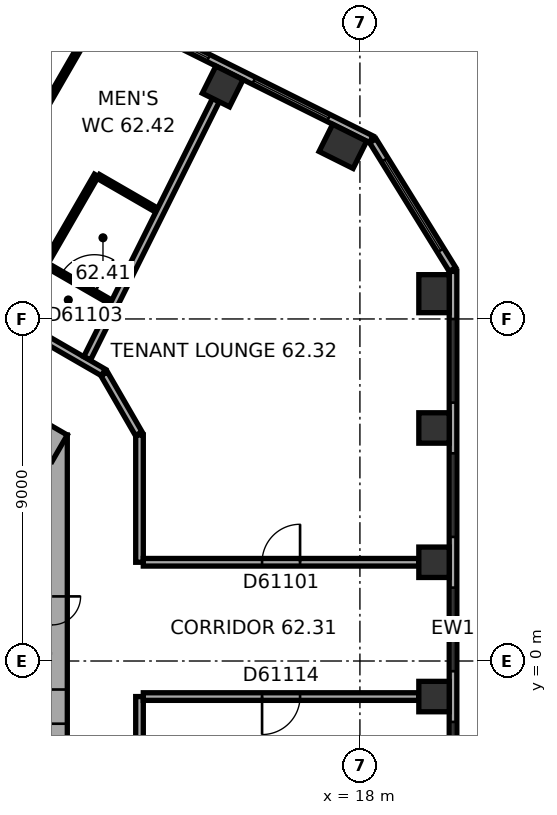
"""IFC4 building model, lengths in metres.
Left out: names, types, materials, properties, quantities, classifications, styles, units other than length and angle.
Written with IfcOpenShell. Run it as: python <this file> out.ifc"""

import sys

from ifc_helpers import new_model, si_unit, direction, frame, frame_2d, origin, origin_2d, place, context, subcontext, project, spatial, rectangle, extrude, element, fill, save


model = new_model("IFC4")
c1 = context("Model", 3, precision=1e-05, world=origin(), true_north=direction((0.0, 1.0)))
c2 = subcontext(c1, "Body", "Model", "MODEL_VIEW")
j1 = project(units=[si_unit("LENGTHUNIT", "METRE"), si_unit("PLANEANGLEUNIT", "RADIAN")], contexts=[c1])
p1 = place(None, origin())
s1 = spatial("IfcSite", under=j1, at=p1, CompositionType="ELEMENT")
p2 = place(p1, origin())
s2 = spatial("IfcBuilding", under=s1, at=p2, CompositionType="ELEMENT")
p3 = place(p2, frame((0.0, 0.0, 251.3)))
s3 = spatial("IfcBuildingStorey", under=s2, at=p3, CompositionType="ELEMENT", Elevation=251.3)
for number, where, z_axis, x_axis in (
    (1, (19.95, -0.936, 0.0), (0.0, 0.0, 1.0), (0.0, 1.0, 0.0)),
    (2, (19.95, 2.598, 0.0), (0.0, 0.0, 1.0), (0.0, 1.0, 0.0)),
    (3, (19.95, 6.132, 0.0), (0.0, 0.0, 1.0), (0.0, 1.0, 0.0)),
):
    element("IfcColumn", number, at=place(p3, frame(where, z_axis=z_axis, x_axis=x_axis)), inside=s3, PredefinedType="COLUMN", context=c2, shape_type="SweptSolid", body=[
        extrude(rectangle(XDim=0.8, YDim=0.8, at=origin_2d()), origin(), (0.0, 0.0, 1.0), 3.7),
    ])
for number, where, z_axis, x_axis in (
    (4, (19.95, 9.665, 0.0), (0.0, 0.0, 1.0), (0.0, 1.0, 0.0)),
    (5, (17.552, 13.541, 0.0), (0.0, 0.0, 1.0), (-0.895, 0.446, 0.0)),
):
    element("IfcColumn", number, at=place(p3, frame(where, z_axis=z_axis, x_axis=x_axis)), inside=s3, PredefinedType="COLUMN", context=c2, shape_type="SweptSolid", body=[
        extrude(rectangle(XDim=1.0, YDim=0.8, at=origin_2d()), origin(), (0.0, 0.0, 1.0), 3.7),
    ])
p4 = place(p3, frame((14.389, 15.118, 0.0), z_axis=(0.0, 0.0, 1.0), x_axis=(-0.894934361602, 0.44619781311, 0.0)))
e6 = element("IfcColumn", 6, at=p4, inside=s3, PredefinedType="COLUMN", context=c2, shape_type="SweptSolid", body=[
    extrude(rectangle(XDim=0.8, YDim=0.8, at=origin_2d()), origin(), (0.0, 0.0, 1.0), 3.7),
])
p5 = place(p3, frame((9.9, -5.947, 0.0), z_axis=(0.0, 0.0, 1.0), x_axis=(0.0, 1.0, 0.0)))
e7 = element("IfcWall", 7, at=p5, inside=s3, PredefinedType="SHEAR", context=c2, shape_type="SweptSolid", body=[
    extrude(rectangle(XDim=11.894, YDim=0.8, at=frame_2d((5.947, 0.0))), origin(), (0.0, 0.0, 1.0), 3.7),
])
p6 = place(p5, frame((6.147, 0.0, 0.0)))
e8 = element("IfcOpeningElement", 8, at=p6, cuts=e7, PredefinedType="OPENING", context=c2, shape_type="SweptSolid", body=[
    extrude(rectangle(XDim=1.5, YDim=2.1, at=frame_2d((0.75, 1.05))), frame((0.0, 0.41, 0.0), z_axis=(0.0, -1.0, 0.0), x_axis=(1.0, 0.0, 0.0)), (0.0, 0.0, 1.0), 0.82),
])
p7 = place(p5, frame((1.697, 0.0, 0.0)))
e9 = element("IfcOpeningElement", 9, at=p7, cuts=e7, PredefinedType="OPENING", context=c2, shape_type="SweptSolid", body=[
    extrude(rectangle(XDim=0.9, YDim=2.1, at=frame_2d((0.45, 1.05))), frame((0.0, 0.41, 0.0), z_axis=(0.0, -1.0, 0.0), x_axis=(1.0, 0.0, 0.0)), (0.0, 0.0, 1.0), 0.82),
])
p8 = place(p5, frame((4.297, 0.0, 0.0)))
e10 = element("IfcOpeningElement", 10, at=p8, cuts=e7, PredefinedType="OPENING", context=c2, shape_type="SweptSolid", body=[
    extrude(rectangle(XDim=0.9, YDim=2.1, at=frame_2d((0.45, 1.05))), frame((0.0, 0.41, 0.0), z_axis=(0.0, -1.0, 0.0), x_axis=(1.0, 0.0, 0.0)), (0.0, 0.0, 1.0), 0.82),
])
p9 = place(p3, frame((10.1, 5.6, 0.0), z_axis=(0.0, 0.0, 1.0), x_axis=(-0.866023897231, 0.500002609418, 0.0)))
e11 = element("IfcWall", 11, at=p9, inside=s3, PredefinedType="SHEAR", context=c2, shape_type="SweptSolid", body=[
    extrude(rectangle(XDim=11.894, YDim=0.8, at=frame_2d((5.947, 0.0))), origin(), (0.0, 0.0, 1.0), 3.7),
])
p10 = place(p9, frame((3.897, 0.0, 0.0)))
e12 = element("IfcOpeningElement", 12, at=p10, cuts=e11, PredefinedType="OPENING", context=c2, shape_type="SweptSolid", body=[
    extrude(rectangle(XDim=0.9, YDim=2.1, at=frame_2d((0.45, 1.05))), frame((0.0, 0.41, 0.0), z_axis=(0.0, -1.0, 0.0), x_axis=(1.0, 0.0, 0.0)), (0.0, 0.0, 1.0), 0.82),
])
p11 = place(p9, frame((7.797, 0.0, 0.0)))
e13 = element("IfcOpeningElement", 13, at=p11, cuts=e11, PredefinedType="OPENING", context=c2, shape_type="SweptSolid", body=[
    extrude(rectangle(XDim=0.9, YDim=2.1, at=frame_2d((0.45, 1.05))), frame((0.0, 0.41, 0.0), z_axis=(0.0, -1.0, 0.0), x_axis=(1.0, 0.0, 0.0)), (0.0, 0.0, 1.0), 0.82),
])
p12 = place(p3, frame((20.45, -8.59, 0.0), z_axis=(0.0, 0.0, 1.0), x_axis=(0.0, 1.0, 0.0)))
e14 = element("IfcWall", 14, at=p12, inside=s3, PredefinedType="STANDARD", context=c2, shape_type="SweptSolid", body=[
    extrude(rectangle(XDim=18.841, YDim=0.2, at=frame_2d((9.421, 0.0))), origin(), (0.0, 0.0, 1.0), 3.7),
])
p13 = place(p12, frame((1.254, 0.0, 0.9)))
e15 = element("IfcOpeningElement", 15, at=p13, cuts=e14, PredefinedType="OPENING", context=c2, shape_type="SweptSolid", body=[
    extrude(rectangle(XDim=2.2, YDim=2.0, at=frame_2d((1.1, 1.0))), frame((0.0, 0.11, 0.0), z_axis=(0.0, -1.0, 0.0), x_axis=(1.0, 0.0, 0.0)), (0.0, 0.0, 1.0), 0.22),
])
p14 = place(p12, frame((4.788, 0.0, 0.9)))
e16 = element("IfcOpeningElement", 16, at=p14, cuts=e14, PredefinedType="OPENING", context=c2, shape_type="SweptSolid", body=[
    extrude(rectangle(XDim=2.2, YDim=2.0, at=frame_2d((1.1, 1.0))), frame((0.0, 0.11, 0.0), z_axis=(0.0, -1.0, 0.0), x_axis=(1.0, 0.0, 0.0)), (0.0, 0.0, 1.0), 0.22),
])
p15 = place(p12, frame((8.322, 0.0, 0.9)))
e17 = element("IfcOpeningElement", 17, at=p15, cuts=e14, PredefinedType="OPENING", context=c2, shape_type="SweptSolid", body=[
    extrude(rectangle(XDim=2.2, YDim=2.0, at=frame_2d((1.1, 1.0))), frame((0.0, 0.11, 0.0), z_axis=(0.0, -1.0, 0.0), x_axis=(1.0, 0.0, 0.0)), (0.0, 0.0, 1.0), 0.22),
])
p16 = place(p12, frame((11.855, 0.0, 0.9)))
e18 = element("IfcOpeningElement", 18, at=p16, cuts=e14, PredefinedType="OPENING", context=c2, shape_type="SweptSolid", body=[
    extrude(rectangle(XDim=2.2, YDim=2.0, at=frame_2d((1.1, 1.0))), frame((0.0, 0.11, 0.0), z_axis=(0.0, -1.0, 0.0), x_axis=(1.0, 0.0, 0.0)), (0.0, 0.0, 1.0), 0.22),
])
p17 = place(p12, frame((15.389, 0.0, 0.9)))
e19 = element("IfcOpeningElement", 19, at=p17, cuts=e14, PredefinedType="OPENING", context=c2, shape_type="SweptSolid", body=[
    extrude(rectangle(XDim=2.2, YDim=2.0, at=frame_2d((1.1, 1.0))), frame((0.0, 0.11, 0.0), z_axis=(0.0, -1.0, 0.0), x_axis=(1.0, 0.0, 0.0)), (0.0, 0.0, 1.0), 0.22),
])
p18 = place(p3, frame((20.435, 10.304, 0.0), z_axis=(0.0, 0.0, 1.0), x_axis=(-0.526202661606, 0.850359194058, 0.0)))
e20 = element("IfcWall", 20, at=p18, inside=s3, PredefinedType="STANDARD", context=c2, shape_type="SweptSolid", body=[
    extrude(rectangle(XDim=3.983, YDim=0.2, at=frame_2d((1.991, 0.0))), origin(), (0.0, 0.0, 1.0), 3.7),
])
p19 = place(p18, frame((0.591, 0.0, 0.9)))
e21 = element("IfcOpeningElement", 21, at=p19, cuts=e20, PredefinedType="OPENING", context=c2, shape_type="SweptSolid", body=[
    extrude(rectangle(XDim=2.8, YDim=2.0, at=frame_2d((1.4, 1.0))), frame((0.0, 0.11, 0.0), z_axis=(0.0, -1.0, 0.0), x_axis=(1.0, 0.0, 0.0)), (0.0, 0.0, 1.0), 0.22),
])
p20 = place(p3, frame((18.299, 13.727, 0.0), z_axis=(0.0, 0.0, 1.0), x_axis=(-0.894934554817, 0.44619742558, 0.0)))
e22 = element("IfcWall", 22, at=p20, inside=s3, PredefinedType="STANDARD", context=c2, shape_type="SweptSolid", body=[
    extrude(rectangle(XDim=18.841, YDim=0.2, at=frame_2d((9.421, 0.0))), origin(), (0.0, 0.0, 1.0), 3.7),
])
p21 = place(p20, frame((1.253, 0.0, 0.9)))
e23 = element("IfcOpeningElement", 23, at=p21, cuts=e22, PredefinedType="OPENING", context=c2, shape_type="SweptSolid", body=[
    extrude(rectangle(XDim=2.2, YDim=2.0, at=frame_2d((1.1, 1.0))), frame((0.0, 0.11, 0.0), z_axis=(0.0, -1.0, 0.0), x_axis=(1.0, 0.0, 0.0)), (0.0, 0.0, 1.0), 0.22),
])
p22 = place(p20, frame((4.786, 0.0, 0.9)))
e24 = element("IfcOpeningElement", 24, at=p22, cuts=e22, PredefinedType="OPENING", context=c2, shape_type="SweptSolid", body=[
    extrude(rectangle(XDim=2.2, YDim=2.0, at=frame_2d((1.1, 1.0))), frame((0.0, 0.11, 0.0), z_axis=(0.0, -1.0, 0.0), x_axis=(1.0, 0.0, 0.0)), (0.0, 0.0, 1.0), 0.22),
])
p23 = place(p20, frame((8.32, 0.0, 0.9)))
e25 = element("IfcOpeningElement", 25, at=p23, cuts=e22, PredefinedType="OPENING", context=c2, shape_type="SweptSolid", body=[
    extrude(rectangle(XDim=2.2, YDim=2.0, at=frame_2d((1.1, 1.0))), frame((0.0, 0.11, 0.0), z_axis=(0.0, -1.0, 0.0), x_axis=(1.0, 0.0, 0.0)), (0.0, 0.0, 1.0), 0.22),
])
p24 = place(p20, frame((11.854, 0.0, 0.9)))
e26 = element("IfcOpeningElement", 26, at=p24, cuts=e22, PredefinedType="OPENING", context=c2, shape_type="SweptSolid", body=[
    extrude(rectangle(XDim=2.2, YDim=2.0, at=frame_2d((1.1, 1.0))), frame((0.0, 0.11, 0.0), z_axis=(0.0, -1.0, 0.0), x_axis=(1.0, 0.0, 0.0)), (0.0, 0.0, 1.0), 0.22),
])
p25 = place(p20, frame((15.387, 0.0, 0.9)))
e27 = element("IfcOpeningElement", 27, at=p25, cuts=e22, PredefinedType="OPENING", context=c2, shape_type="SweptSolid", body=[
    extrude(rectangle(XDim=2.2, YDim=2.0, at=frame_2d((1.1, 1.0))), frame((0.0, 0.11, 0.0), z_axis=(0.0, -1.0, 0.0), x_axis=(1.0, 0.0, 0.0)), (0.0, 0.0, 1.0), 0.22),
])
p26 = place(p3, frame((10.805, 16.458, 0.0), z_axis=(0.0, 0.0, 1.0), x_axis=(-0.500025478307, -0.866010693377, 0.0)))
e28 = element("IfcWall", 28, at=p26, inside=s3, PredefinedType="PARTITIONING", context=c2, shape_type="SweptSolid", body=[
    extrude(rectangle(XDim=5.696, YDim=0.12, at=frame_2d((2.848, 0.0))), origin(), (0.0, 0.0, 1.0), 2.65),
])
p27 = place(p3, frame((11.065, 12.78, 0.0), z_axis=(0.0, 0.0, 1.0), x_axis=(-0.499938597367, -0.866060851709, 0.0)))
e29 = element("IfcWall", 29, at=p27, inside=s3, PredefinedType="PARTITIONING", context=c2, shape_type="SweptSolid", body=[
    extrude(rectangle(XDim=2.64, YDim=0.12, at=frame_2d((1.32, 0.0))), origin(), (0.0, 0.0, 1.0), 3.35),
])
p28 = place(p3, frame((11.25, 7.592, 0.0), z_axis=(0.0, 0.0, 1.0), x_axis=(-0.866024037175, 0.500002367029, 0.0)))
e30 = element("IfcWall", 30, at=p28, inside=s3, PredefinedType="PARTITIONING", context=c2, shape_type="SweptSolid", body=[
    extrude(rectangle(XDim=11.854, YDim=0.2, at=frame_2d((5.927, 0.0))), origin(), (0.0, 0.0, 1.0), 3.35),
])
p29 = place(p28, frame((3.59, 0.0, 0.0)))
e31 = element("IfcOpeningElement", 31, at=p29, cuts=e30, PredefinedType="OPENING", context=c2, shape_type="SweptSolid", body=[
    extrude(rectangle(XDim=1.0, YDim=2.1, at=frame_2d((0.5, 1.05))), frame((0.0, 0.11, 0.0), z_axis=(0.0, -1.0, 0.0), x_axis=(1.0, 0.0, 0.0)), (0.0, 0.0, 1.0), 0.22),
])
p30 = place(p3, frame((11.447, 9.441, 0.0), z_axis=(0.0, 0.0, 1.0), x_axis=(-0.866016001002, 0.500016285743, 0.0)))
e32 = element("IfcWall", 32, at=p30, inside=s3, PredefinedType="PARTITIONING", context=c2, shape_type="SweptSolid", body=[
    extrude(rectangle(XDim=6.881, YDim=0.12, at=frame_2d((3.44, 0.0))), origin(), (0.0, 0.0, 1.0), 3.35),
])
p31 = place(p30, frame((0.5, 0.0, 0.0)))
e33 = element("IfcOpeningElement", 33, at=p31, cuts=e32, PredefinedType="OPENING", context=c2, shape_type="SweptSolid", body=[
    extrude(rectangle(XDim=1.0, YDim=2.1, at=frame_2d((0.5, 1.05))), frame((0.0, 0.07, 0.0), z_axis=(0.0, -1.0, 0.0), x_axis=(1.0, 0.0, 0.0)), (0.0, 0.0, 1.0), 0.14),
])
p32 = place(p30, frame((2.583, 0.0, 0.0)))
e34 = element("IfcOpeningElement", 34, at=p32, cuts=e32, PredefinedType="OPENING", context=c2, shape_type="SweptSolid", body=[
    extrude(rectangle(XDim=0.9, YDim=2.1, at=frame_2d((0.45, 1.05))), frame((0.0, 0.07, 0.0), z_axis=(0.0, -1.0, 0.0), x_axis=(1.0, 0.0, 0.0)), (0.0, 0.0, 1.0), 0.14),
])
p33 = place(p30, frame((5.023, 0.0, 0.0)))
e35 = element("IfcOpeningElement", 35, at=p33, cuts=e32, PredefinedType="OPENING", context=c2, shape_type="SweptSolid", body=[
    extrude(rectangle(XDim=0.9, YDim=2.1, at=frame_2d((0.45, 1.05))), frame((0.0, 0.07, 0.0), z_axis=(0.0, -1.0, 0.0), x_axis=(1.0, 0.0, 0.0)), (0.0, 0.0, 1.0), 0.14),
])
p34 = place(p3, frame((12.18, 5.981, 0.0), z_axis=(0.0, 0.0, 1.0), x_axis=(-0.499904359745, 0.86608061467, 0.0)))
e36 = element("IfcWall", 36, at=p34, inside=s3, PredefinedType="PARTITIONING", context=c2, shape_type="SweptSolid", body=[
    extrude(rectangle(XDim=1.82, YDim=0.2, at=frame_2d((0.91, 0.0))), origin(), (0.0, 0.0, 1.0), 3.35),
])
p35 = place(p3, frame((12.2, -5.907, 0.0), z_axis=(0.0, 0.0, 1.0), x_axis=(0.0, 1.0, 0.0)))
e37 = element("IfcWall", 37, at=p35, inside=s3, PredefinedType="PARTITIONING", context=c2, shape_type="SweptSolid", body=[
    extrude(rectangle(XDim=4.971, YDim=0.2, at=frame_2d((2.486, 0.0))), origin(), (0.0, 0.0, 1.0), 3.35),
])
p36 = place(p3, frame((12.2, 2.598, 0.0), z_axis=(0.0, 0.0, 1.0), x_axis=(0.0, 1.0, 0.0)))
e38 = element("IfcWall", 38, at=p36, inside=s3, PredefinedType="PARTITIONING", context=c2, shape_type="SweptSolid", body=[
    extrude(rectangle(XDim=3.349, YDim=0.2, at=frame_2d((1.674, 0.0))), origin(), (0.0, 0.0, 1.0), 3.35),
])
p37 = place(p3, frame((12.3, -0.936, 0.0), z_axis=(0.0, 0.0, 1.0), x_axis=(1.0, 0.0, 0.0)))
e39 = element("IfcWall", 39, at=p37, inside=s3, PredefinedType="PARTITIONING", context=c2, shape_type="SweptSolid", body=[
    extrude(rectangle(XDim=7.25, YDim=0.2, at=frame_2d((3.625, 0.0))), origin(), (0.0, 0.0, 1.0), 2.65),
])
p38 = place(p37, frame((3.125, 0.0, 0.0)))
e40 = element("IfcOpeningElement", 40, at=p38, cuts=e39, PredefinedType="OPENING", context=c2, shape_type="SweptSolid", body=[
    extrude(rectangle(XDim=1.0, YDim=2.1, at=frame_2d((0.5, 1.05))), frame((0.0, 0.11, 0.0), z_axis=(0.0, -1.0, 0.0), x_axis=(1.0, 0.0, 0.0)), (0.0, 0.0, 1.0), 0.22),
])
p39 = place(p3, frame((12.654, 11.862, 0.0), z_axis=(0.0, 0.0, 1.0), x_axis=(-0.866025242659, 0.500000279077, 0.0)))
e41 = element("IfcWall", 41, at=p39, inside=s3, PredefinedType="PARTITIONING", context=c2, shape_type="SweptSolid", body=[
    extrude(rectangle(XDim=1.775, YDim=0.12, at=frame_2d((0.887, 0.0))), origin(), (0.0, 0.0, 1.0), 3.35),
])
p40 = place(p3, frame((14.211, 14.76, 0.0), z_axis=(0.0, 0.0, 1.0), x_axis=(-0.446197176117, -0.894934679195, 0.0)))
e42 = element("IfcWall", 42, at=p40, inside=s3, PredefinedType="PARTITIONING", context=c2, shape_type="SweptSolid", body=[
    extrude(rectangle(XDim=7.592, YDim=0.2, at=frame_2d((3.796, 0.0))), origin(), (0.0, 0.0, 1.0), 3.35),
])
p41 = place(p3, frame((19.55, 2.598, 0.0), z_axis=(0.0, 0.0, 1.0), x_axis=(-1.0, 0.0, 0.0)))
e43 = element("IfcWall", 43, at=p41, inside=s3, PredefinedType="PARTITIONING", context=c2, shape_type="SweptSolid", body=[
    extrude(rectangle(XDim=7.25, YDim=0.2, at=frame_2d((3.625, 0.0))), origin(), (0.0, 0.0, 1.0), 3.35),
])
p42 = place(p41, frame((3.125, 0.0, 0.0)))
e44 = element("IfcOpeningElement", 44, at=p42, cuts=e43, PredefinedType="OPENING", context=c2, shape_type="SweptSolid", body=[
    extrude(rectangle(XDim=1.0, YDim=2.1, at=frame_2d((0.5, 1.05))), frame((0.0, 0.11, 0.0), z_axis=(0.0, -1.0, 0.0), x_axis=(1.0, 0.0, 0.0)), (0.0, 0.0, 1.0), 0.22),
])
p43 = place(p14, origin())
e45 = element("IfcWindow", 45, at=p43, inside=s3, PartitioningType="SINGLE_PANEL", PredefinedType="WINDOW", context=c2, shape_type="SweptSolid", body=[
    extrude(rectangle(XDim=2.2, YDim=2.0, at=frame_2d((1.1, 1.0))), frame((0.0, 0.03, 0.0), z_axis=(0.0, -1.0, 0.0), x_axis=(1.0, 0.0, 0.0)), (0.0, 0.0, 1.0), 0.06),
])
fill(e16, e45)
p44 = place(p15, origin())
e46 = element("IfcWindow", 46, at=p44, inside=s3, PartitioningType="SINGLE_PANEL", PredefinedType="WINDOW", context=c2, shape_type="SweptSolid", body=[
    extrude(rectangle(XDim=2.2, YDim=2.0, at=frame_2d((1.1, 1.0))), frame((0.0, 0.03, 0.0), z_axis=(0.0, -1.0, 0.0), x_axis=(1.0, 0.0, 0.0)), (0.0, 0.0, 1.0), 0.06),
])
fill(e17, e46)
p45 = place(p16, origin())
e47 = element("IfcWindow", 47, at=p45, inside=s3, PartitioningType="SINGLE_PANEL", PredefinedType="WINDOW", context=c2, shape_type="SweptSolid", body=[
    extrude(rectangle(XDim=2.2, YDim=2.0, at=frame_2d((1.1, 1.0))), frame((0.0, 0.03, 0.0), z_axis=(0.0, -1.0, 0.0), x_axis=(1.0, 0.0, 0.0)), (0.0, 0.0, 1.0), 0.06),
])
fill(e18, e47)
p46 = place(p17, origin())
e48 = element("IfcWindow", 48, at=p46, inside=s3, PartitioningType="SINGLE_PANEL", PredefinedType="WINDOW", context=c2, shape_type="SweptSolid", body=[
    extrude(rectangle(XDim=2.2, YDim=2.0, at=frame_2d((1.1, 1.0))), frame((0.0, 0.03, 0.0), z_axis=(0.0, -1.0, 0.0), x_axis=(1.0, 0.0, 0.0)), (0.0, 0.0, 1.0), 0.06),
])
fill(e19, e48)
p47 = place(p19, origin())
e49 = element("IfcWindow", 49, at=p47, inside=s3, PartitioningType="SINGLE_PANEL", PredefinedType="WINDOW", context=c2, shape_type="SweptSolid", body=[
    extrude(rectangle(XDim=2.8, YDim=2.0, at=frame_2d((1.4, 1.0))), frame((0.0, 0.03, 0.0), z_axis=(0.0, -1.0, 0.0), x_axis=(1.0, 0.0, 0.0)), (0.0, 0.0, 1.0), 0.06),
])
fill(e21, e49)
p48 = place(p21, origin())
e50 = element("IfcWindow", 50, at=p48, inside=s3, PartitioningType="SINGLE_PANEL", PredefinedType="WINDOW", context=c2, shape_type="SweptSolid", body=[
    extrude(rectangle(XDim=2.2, YDim=2.0, at=frame_2d((1.1, 1.0))), frame((0.0, 0.03, 0.0), z_axis=(0.0, -1.0, 0.0), x_axis=(1.0, 0.0, 0.0)), (0.0, 0.0, 1.0), 0.06),
])
fill(e23, e50)
p49 = place(p22, origin())
e51 = element("IfcWindow", 51, at=p49, inside=s3, PartitioningType="SINGLE_PANEL", PredefinedType="WINDOW", context=c2, shape_type="SweptSolid", body=[
    extrude(rectangle(XDim=2.2, YDim=2.0, at=frame_2d((1.1, 1.0))), frame((0.0, 0.03, 0.0), z_axis=(0.0, -1.0, 0.0), x_axis=(1.0, 0.0, 0.0)), (0.0, 0.0, 1.0), 0.06),
])
fill(e24, e51)
p50 = place(p6, origin())
e52 = element("IfcDoor", 52, at=p50, inside=s3, OperationType="DOUBLE_DOOR_SINGLE_SWING", PredefinedType="DOOR", context=c2, shape_type="SweptSolid", body=[
    extrude(rectangle(XDim=1.5, YDim=2.1, at=frame_2d((0.75, 1.05))), frame((0.0, 0.025, 0.0), z_axis=(0.0, -1.0, 0.0), x_axis=(1.0, 0.0, 0.0)), (0.0, 0.0, 1.0), 0.05),
])
fill(e8, e52)
p51 = place(p8, origin())
e53 = element("IfcDoor", 53, at=p51, inside=s3, OperationType="SINGLE_SWING_LEFT", PredefinedType="DOOR", context=c2, shape_type="SweptSolid", body=[
    extrude(rectangle(XDim=0.9, YDim=2.1, at=frame_2d((0.45, 1.05))), frame((0.0, 0.025, 0.0), z_axis=(0.0, -1.0, 0.0), x_axis=(1.0, 0.0, 0.0)), (0.0, 0.0, 1.0), 0.05),
])
fill(e10, e53)
p52 = place(p42, origin())
e54 = element("IfcDoor", 54, at=p52, inside=s3, OperationType="SINGLE_SWING_LEFT", PredefinedType="DOOR", context=c2, shape_type="SweptSolid", body=[
    extrude(rectangle(XDim=1.0, YDim=2.1, at=frame_2d((0.5, 1.05))), frame((0.0, 0.025, 0.0), z_axis=(0.0, -1.0, 0.0), x_axis=(1.0, 0.0, 0.0)), (0.0, 0.0, 1.0), 0.05),
])
fill(e44, e54)
p53 = place(p31, origin())
e55 = element("IfcDoor", 55, at=p53, inside=s3, OperationType="SINGLE_SWING_LEFT", PredefinedType="DOOR", context=c2, shape_type="SweptSolid", body=[
    extrude(rectangle(XDim=1.0, YDim=2.1, at=frame_2d((0.5, 1.05))), frame((0.0, 0.025, 0.0), z_axis=(0.0, -1.0, 0.0), x_axis=(1.0, 0.0, 0.0)), (0.0, 0.0, 1.0), 0.05),
])
fill(e33, e55)
p54 = place(p38, origin())
e56 = element("IfcDoor", 56, at=p54, inside=s3, OperationType="SINGLE_SWING_LEFT", PredefinedType="DOOR", context=c2, shape_type="SweptSolid", body=[
    extrude(rectangle(XDim=1.0, YDim=2.1, at=frame_2d((0.5, 1.05))), frame((0.0, 0.025, 0.0), z_axis=(0.0, -1.0, 0.0), x_axis=(1.0, 0.0, 0.0)), (0.0, 0.0, 1.0), 0.05),
])
fill(e40, e56)
save(model, sys.argv[1])
